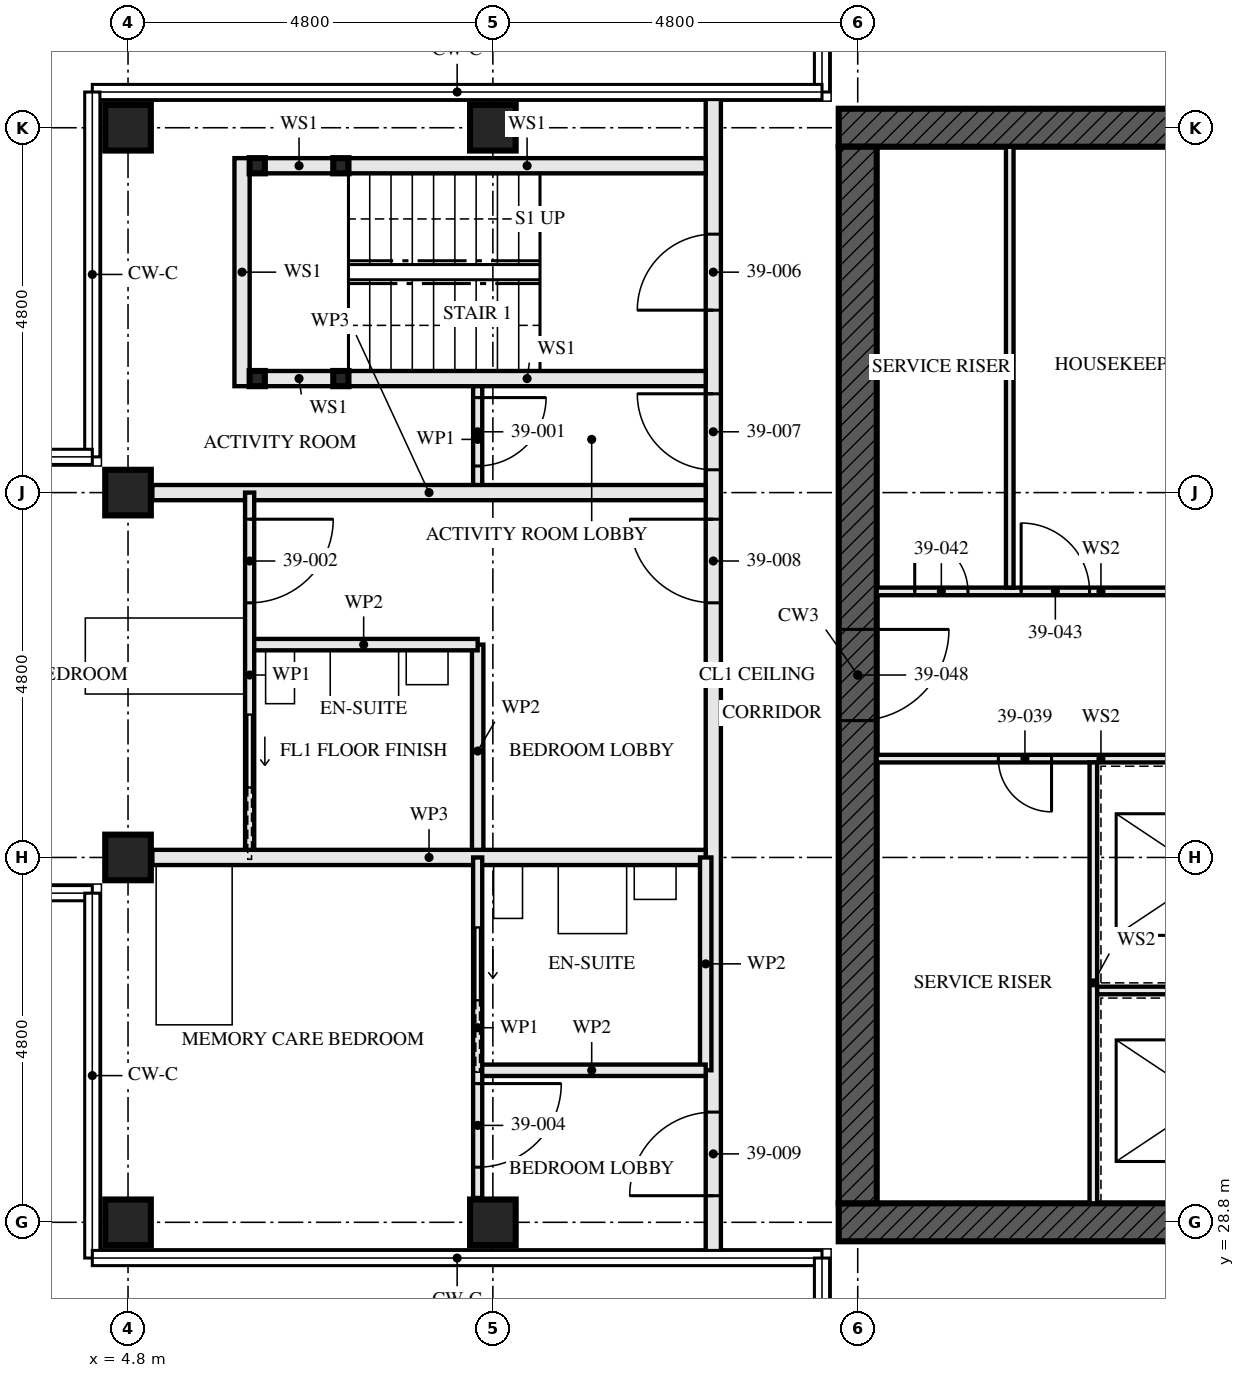
"""IFC4 building model, lengths in metres.
Left out: names, types, materials, properties, quantities, classifications, styles, units other than length and angle.
Written with IfcOpenShell. Run it as: python <this file> out.ifc"""

import sys

from ifc_helpers import new_model, si_unit, direction, frame, frame_2d, origin, origin_2d, place, context, subcontext, project, spatial, rectangle, hollow_rectangle, extrude, element, fill, save


model = new_model("IFC4")
c1 = context("Model", 3, precision=1e-05, world=origin(), true_north=direction((0.0, 1.0)))
c2 = subcontext(c1, "Body", "Model", "MODEL_VIEW")
j1 = project(units=[si_unit("LENGTHUNIT", "METRE"), si_unit("PLANEANGLEUNIT", "RADIAN")], contexts=[c1])
p1 = place(None, origin())
s1 = spatial("IfcSite", under=j1, at=p1, CompositionType="ELEMENT")
p2 = place(p1, origin())
s2 = spatial("IfcBuilding", under=s1, at=p2, CompositionType="ELEMENT")
p3 = place(p2, frame((0.0, 0.0, 144.5)))
s3 = spatial("IfcBuildingStorey", under=s2, at=p3, CompositionType="ELEMENT", Elevation=144.5)
for number, where, z_axis, x_axis in (
    (1, (4.8, 28.8, 0.0), (0.0, 0.0, 1.0), (0.0, 1.0, 0.0)),
    (2, (4.8, 33.6, 0.0), (0.0, 0.0, 1.0), (0.0, 1.0, 0.0)),
    (3, (4.8, 38.4, 0.0), (0.0, 0.0, 1.0), (0.0, 1.0, 0.0)),
    (4, (4.8, 43.2, 0.0), (0.0, 0.0, 1.0), (0.0, 1.0, 0.0)),
    (5, (9.6, 28.8, 0.0), (0.0, 0.0, 1.0), (0.0, 1.0, 0.0)),
    (6, (9.6, 43.2, 0.0), (0.0, 0.0, 1.0), (0.0, 1.0, 0.0)),
):
    element("IfcColumn", number, at=place(p3, frame(where, z_axis=z_axis, x_axis=x_axis)), inside=s3, PredefinedType="COLUMN", context=c2, shape_type="SweptSolid", body=[
        extrude(hollow_rectangle(XDim=0.6, YDim=0.6, WallThickness=0.08, at=origin_2d()), origin(), (0.0, 0.0, 1.0), 3.5),
    ])
p4 = place(p3, frame((14.15, 28.8, -0.17), z_axis=(0.0, 0.0, 1.0), x_axis=(1.0, 0.0, 0.0)))
e7 = element("IfcWall", 7, at=p4, inside=s3, PredefinedType="SHEAR", context=c2, shape_type="SweptSolid", body=[
    extrude(rectangle(XDim=14.9, YDim=0.5, at=frame_2d((7.45, 0.0))), origin(), (0.0, 0.0, 1.0), 3.5),
])
p5 = place(p4, frame((6.85, 0.0, 0.17)))
e8 = element("IfcOpeningElement", 8, at=p5, cuts=e7, PredefinedType="OPENING", context=c2, shape_type="SweptSolid", body=[
    extrude(rectangle(XDim=1.2, YDim=2.1, at=frame_2d((0.6, 1.05))), frame((0.0, 0.26, 0.0), z_axis=(0.0, -1.0, 0.0), x_axis=(1.0, 0.0, 0.0)), (0.0, 0.0, 1.0), 0.521),
])
p6 = place(p3, frame((29.05, 43.2, -0.17), z_axis=(0.0, 0.0, 1.0), x_axis=(-1.0, 0.0, 0.0)))
e9 = element("IfcWall", 9, at=p6, inside=s3, PredefinedType="SHEAR", context=c2, shape_type="SweptSolid", body=[
    extrude(rectangle(XDim=14.9, YDim=0.5, at=frame_2d((7.45, 0.0))), origin(), (0.0, 0.0, 1.0), 3.5),
])
p7 = place(p6, frame((6.85, 0.0, 0.17)))
e10 = element("IfcOpeningElement", 10, at=p7, cuts=e9, PredefinedType="OPENING", context=c2, shape_type="SweptSolid", body=[
    extrude(rectangle(XDim=1.2, YDim=2.1, at=frame_2d((0.6, 1.05))), frame((0.0, 0.26, 0.0), z_axis=(0.0, -1.0, 0.0), x_axis=(1.0, 0.0, 0.0)), (0.0, 0.0, 1.0), 0.521),
])
p8 = place(p3, frame((14.4, 42.95, -0.17), z_axis=(0.0, 0.0, 1.0), x_axis=(0.0, -1.0, 0.0)))
e11 = element("IfcWall", 11, at=p8, inside=s3, PredefinedType="SHEAR", context=c2, shape_type="SweptSolid", body=[
    extrude(rectangle(XDim=13.9, YDim=0.5, at=frame_2d((6.95, 0.0))), origin(), (0.0, 0.0, 1.0), 3.5),
])
p9 = place(p8, frame((6.35, 0.0, 0.17)))
e12 = element("IfcOpeningElement", 12, at=p9, cuts=e11, PredefinedType="OPENING", context=c2, shape_type="SweptSolid", body=[
    extrude(rectangle(XDim=1.2, YDim=2.1, at=frame_2d((0.6, 1.05))), frame((0.0, 0.26, 0.0), z_axis=(0.0, -1.0, 0.0), x_axis=(1.0, 0.0, 0.0)), (0.0, 0.0, 1.0), 0.521),
])
for number, where, z_axis, x_axis in (
    (13, (6.5, 42.7, 0.0), (0.0, 0.0, 1.0), (1.0, 0.0, 0.0)),
    (14, (6.5, 39.9, 0.0), (0.0, 0.0, 1.0), (1.0, 0.0, 0.0)),
    (15, (7.6, 42.7, 0.0), (0.0, 0.0, 1.0), (1.0, 0.0, 0.0)),
    (16, (7.6, 39.9, 0.0), (0.0, 0.0, 1.0), (1.0, 0.0, 0.0)),
):
    element("IfcColumn", number, at=place(p3, frame(where, z_axis=z_axis, x_axis=x_axis)), inside=s3, PredefinedType="COLUMN", context=c2, shape_type="SweptSolid", body=[
        extrude(hollow_rectangle(XDim=0.2, YDim=0.2, WallThickness=0.008, at=origin_2d()), origin(), (0.0, 0.0, 1.0), 3.33),
    ])
p10 = place(p3, frame((6.6, 42.7, 0.0), z_axis=(0.0, 0.0, 1.0), x_axis=(1.0, 0.0, 0.0)))
e17 = element("IfcWall", 17, at=p10, inside=s3, PredefinedType="SOLIDWALL", context=c2, shape_type="SweptSolid", body=[
    extrude(rectangle(XDim=0.9, YDim=0.2, at=frame_2d((0.45, 0.0))), origin(), (0.0, 0.0, 1.0), 2.99),
])
p11 = place(p3, frame((7.7, 42.7, 0.0), z_axis=(0.0, 0.0, 1.0), x_axis=(1.0, 0.0, 0.0)))
e18 = element("IfcWall", 18, at=p11, inside=s3, PredefinedType="SOLIDWALL", context=c2, shape_type="SweptSolid", body=[
    extrude(rectangle(XDim=4.7, YDim=0.2, at=frame_2d((2.35, 0.0))), origin(), (0.0, 0.0, 1.0), 2.99),
])
p12 = place(p3, frame((6.6, 39.9, 0.0), z_axis=(0.0, 0.0, 1.0), x_axis=(1.0, 0.0, 0.0)))
e19 = element("IfcWall", 19, at=p12, inside=s3, PredefinedType="SOLIDWALL", context=c2, shape_type="SweptSolid", body=[
    extrude(rectangle(XDim=0.9, YDim=0.2, at=frame_2d((0.45, 0.0))), origin(), (0.0, 0.0, 1.0), 2.99),
])
p13 = place(p3, frame((7.7, 39.9, 0.0), z_axis=(0.0, 0.0, 1.0), x_axis=(1.0, 0.0, 0.0)))
e20 = element("IfcWall", 20, at=p13, inside=s3, PredefinedType="SOLIDWALL", context=c2, shape_type="SweptSolid", body=[
    extrude(rectangle(XDim=4.7, YDim=0.2, at=frame_2d((2.35, 0.0))), origin(), (0.0, 0.0, 1.0), 2.99),
])
p14 = place(p3, frame((6.3, 42.8, 0.0), z_axis=(0.0, 0.0, 1.0), x_axis=(0.0, -1.0, 0.0)))
e21 = element("IfcWall", 21, at=p14, inside=s3, PredefinedType="SOLIDWALL", context=c2, shape_type="SweptSolid", body=[
    extrude(rectangle(XDim=3.0, YDim=0.2, at=frame_2d((1.5, 0.0))), origin(), (0.0, 0.0, 1.0), 3.33),
])
p15 = place(p3, frame((9.4, 39.8, 0.0), z_axis=(0.0, 0.0, 1.0), x_axis=(0.0, -1.0, 0.0)))
e22 = element("IfcWall", 22, at=p15, inside=s3, PredefinedType="PARTITIONING", context=c2, shape_type="SweptSolid", body=[
    extrude(rectangle(XDim=1.4, YDim=0.12, at=frame_2d((0.7, 0.0))), origin(), (0.0, 0.0, 1.0), 3.33),
])
p16 = place(p15, frame((0.15, 0.0, 0.0)))
e23 = element("IfcOpeningElement", 23, at=p16, cuts=e22, PredefinedType="OPENING", context=c2, shape_type="SweptSolid", body=[
    extrude(rectangle(XDim=0.9, YDim=2.1, at=frame_2d((0.45, 1.05))), frame((0.0, 0.071, 0.0), z_axis=(0.0, -1.0, 0.0), x_axis=(1.0, 0.0, 0.0)), (0.0, 0.0, 1.0), 0.141),
])
p17 = place(p3, frame((5.12, 38.4, 0.0), z_axis=(0.0, 0.0, 1.0), x_axis=(1.0, 0.0, 0.0)))
e24 = element("IfcWall", 24, at=p17, inside=s3, PredefinedType="PARTITIONING", context=c2, shape_type="SweptSolid", body=[
    extrude(rectangle(XDim=7.28, YDim=0.2, at=frame_2d((3.64, 0.0))), origin(), (0.0, 0.0, 1.0), 2.55),
])
p18 = place(p3, frame((6.4, 36.4, 0.0), z_axis=(0.0, 0.0, 1.0), x_axis=(1.0, 0.0, 0.0)))
e25 = element("IfcWall", 25, at=p18, inside=s3, PredefinedType="PARTITIONING", context=c2, shape_type="SweptSolid", body=[
    extrude(rectangle(XDim=3.0, YDim=0.15, at=frame_2d((1.5, 0.0))), origin(), (0.0, 0.0, 1.0), 3.33),
])
p19 = place(p3, frame((9.4, 36.4, 0.0), z_axis=(0.0, 0.0, 1.0), x_axis=(0.0, -1.0, 0.0)))
e26 = element("IfcWall", 26, at=p19, inside=s3, PredefinedType="PARTITIONING", context=c2, shape_type="SweptSolid", body=[
    extrude(rectangle(XDim=2.8, YDim=0.15, at=frame_2d((1.4, 0.0))), origin(), (0.0, 0.0, 1.0), 3.33),
])
p20 = place(p3, frame((6.4, 38.4, 0.0), z_axis=(0.0, 0.0, 1.0), x_axis=(0.0, -1.0, 0.0)))
e27 = element("IfcWall", 27, at=p20, inside=s3, PredefinedType="PARTITIONING", context=c2, shape_type="SweptSolid", body=[
    extrude(rectangle(XDim=4.8, YDim=0.12, at=frame_2d((2.4, 0.0))), origin(), (0.0, 0.0, 1.0), 3.33),
])
p21 = place(p20, frame((0.35, 0.0, 0.0)))
e28 = element("IfcOpeningElement", 28, at=p21, cuts=e27, PredefinedType="OPENING", context=c2, shape_type="SweptSolid", body=[
    extrude(rectangle(XDim=1.1, YDim=2.1, at=frame_2d((0.55, 1.05))), frame((0.0, 0.071, 0.0), z_axis=(0.0, -1.0, 0.0), x_axis=(1.0, 0.0, 0.0)), (0.0, 0.0, 1.0), 0.141),
])
p22 = place(p20, frame((2.925, 0.0, 0.0)))
e29 = element("IfcOpeningElement", 29, at=p22, cuts=e27, PredefinedType="OPENING", context=c2, shape_type="SweptSolid", body=[
    extrude(rectangle(XDim=0.95, YDim=2.1, at=frame_2d((0.475, 1.05))), frame((0.0, 0.071, 0.0), z_axis=(0.0, -1.0, 0.0), x_axis=(1.0, 0.0, 0.0)), (0.0, 0.0, 1.0), 0.141),
])
p23 = place(p3, frame((5.12, 33.6, 0.0), z_axis=(0.0, 0.0, 1.0), x_axis=(1.0, 0.0, 0.0)))
e30 = element("IfcWall", 30, at=p23, inside=s3, PredefinedType="PARTITIONING", context=c2, shape_type="SweptSolid", body=[
    extrude(rectangle(XDim=7.28, YDim=0.2, at=frame_2d((3.64, 0.0))), origin(), (0.0, 0.0, 1.0), 2.55),
])
p24 = place(p3, frame((9.4, 30.8, 0.0), z_axis=(0.0, 0.0, 1.0), x_axis=(1.0, 0.0, 0.0)))
e31 = element("IfcWall", 31, at=p24, inside=s3, PredefinedType="PARTITIONING", context=c2, shape_type="SweptSolid", body=[
    extrude(rectangle(XDim=3.0, YDim=0.15, at=frame_2d((1.5, 0.0))), origin(), (0.0, 0.0, 1.0), 3.33),
])
p25 = place(p3, frame((12.4, 33.6, 0.0), z_axis=(0.0, 0.0, 1.0), x_axis=(0.0, -1.0, 0.0)))
e32 = element("IfcWall", 32, at=p25, inside=s3, PredefinedType="PARTITIONING", context=c2, shape_type="SweptSolid", body=[
    extrude(rectangle(XDim=2.8, YDim=0.15, at=frame_2d((1.4, 0.0))), origin(), (0.0, 0.0, 1.0), 3.33),
])
p26 = place(p3, frame((9.4, 33.6, 0.0), z_axis=(0.0, 0.0, 1.0), x_axis=(0.0, -1.0, 0.0)))
e33 = element("IfcWall", 33, at=p26, inside=s3, PredefinedType="PARTITIONING", context=c2, shape_type="SweptSolid", body=[
    extrude(rectangle(XDim=4.48, YDim=0.12, at=frame_2d((2.24, 0.0))), origin(), (0.0, 0.0, 1.0), 3.33),
])
p27 = place(p26, frame((2.975, 0.0, 0.0)))
e34 = element("IfcOpeningElement", 34, at=p27, cuts=e33, PredefinedType="OPENING", context=c2, shape_type="SweptSolid", body=[
    extrude(rectangle(XDim=1.1, YDim=2.1, at=frame_2d((0.55, 1.05))), frame((0.0, 0.071, 0.0), z_axis=(0.0, -1.0, 0.0), x_axis=(1.0, 0.0, 0.0)), (0.0, 0.0, 1.0), 0.141),
])
p28 = place(p26, frame((0.925, 0.0, 0.0)))
e35 = element("IfcOpeningElement", 35, at=p28, cuts=e33, PredefinedType="OPENING", context=c2, shape_type="SweptSolid", body=[
    extrude(rectangle(XDim=0.95, YDim=2.1, at=frame_2d((0.475, 1.05))), frame((0.0, 0.071, 0.0), z_axis=(0.0, -1.0, 0.0), x_axis=(1.0, 0.0, 0.0)), (0.0, 0.0, 1.0), 0.141),
])
p29 = place(p3, frame((12.5, 43.65, 0.0), z_axis=(0.0, 0.0, 1.0), x_axis=(0.0, -1.0, 0.0)))
e36 = element("IfcWall", 36, at=p29, inside=s3, PredefinedType="PARTITIONING", context=c2, shape_type="SweptSolid", body=[
    extrude(rectangle(XDim=15.3, YDim=0.2, at=frame_2d((7.65, 0.0))), origin(), (0.0, 0.0, 1.0), 2.32),
])
p30 = place(p29, frame((1.85, 0.0, 0.0)))
e37 = element("IfcOpeningElement", 37, at=p30, cuts=e36, PredefinedType="OPENING", context=c2, shape_type="SweptSolid", body=[
    extrude(rectangle(XDim=1.0, YDim=2.1, at=frame_2d((0.5, 1.05))), frame((0.0, 0.111, 0.0), z_axis=(0.0, -1.0, 0.0), x_axis=(1.0, 0.0, 0.0)), (0.0, 0.0, 1.0), 0.221),
])
p31 = place(p29, frame((3.95, 0.0, 0.0)))
e38 = element("IfcOpeningElement", 38, at=p31, cuts=e36, PredefinedType="OPENING", context=c2, shape_type="SweptSolid", body=[
    extrude(rectangle(XDim=1.0, YDim=2.1, at=frame_2d((0.5, 1.05))), frame((0.0, 0.111, 0.0), z_axis=(0.0, -1.0, 0.0), x_axis=(1.0, 0.0, 0.0)), (0.0, 0.0, 1.0), 0.221),
])
p32 = place(p29, frame((5.6, 0.0, 0.0)))
e39 = element("IfcOpeningElement", 39, at=p32, cuts=e36, PredefinedType="OPENING", context=c2, shape_type="SweptSolid", body=[
    extrude(rectangle(XDim=1.1, YDim=2.1, at=frame_2d((0.55, 1.05))), frame((0.0, 0.111, 0.0), z_axis=(0.0, -1.0, 0.0), x_axis=(1.0, 0.0, 0.0)), (0.0, 0.0, 1.0), 0.221),
])
p33 = place(p29, frame((13.4, 0.0, 0.0)))
e40 = element("IfcOpeningElement", 40, at=p33, cuts=e36, PredefinedType="OPENING", context=c2, shape_type="SweptSolid", body=[
    extrude(rectangle(XDim=1.1, YDim=2.1, at=frame_2d((0.55, 1.05))), frame((0.0, 0.111, 0.0), z_axis=(0.0, -1.0, 0.0), x_axis=(1.0, 0.0, 0.0)), (0.0, 0.0, 1.0), 0.221),
])
p34 = place(p3, frame((16.4, 37.15, 0.0), z_axis=(0.0, 0.0, 1.0), x_axis=(0.0, 1.0, 0.0)))
e41 = element("IfcWall", 41, at=p34, inside=s3, PredefinedType="SOLIDWALL", context=c2, shape_type="SweptSolid", body=[
    extrude(rectangle(XDim=5.8, YDim=0.1, at=frame_2d((2.9, 0.0))), origin(), (0.0, 0.0, 1.0), 3.33),
])
p35 = place(p3, frame((14.65, 34.9, 0.0), z_axis=(0.0, 0.0, 1.0), x_axis=(1.0, 0.0, 0.0)))
e42 = element("IfcWall", 42, at=p35, inside=s3, PredefinedType="SOLIDWALL", context=c2, shape_type="SweptSolid", body=[
    extrude(rectangle(XDim=5.9, YDim=0.1, at=frame_2d((2.95, 0.0))), origin(), (0.0, 0.0, 1.0), 3.33),
])
p36 = place(p35, frame((1.6, 0.0, 0.0)))
e43 = element("IfcOpeningElement", 43, at=p36, cuts=e42, PredefinedType="OPENING", context=c2, shape_type="SweptSolid", body=[
    extrude(rectangle(XDim=0.7, YDim=2.1, at=frame_2d((0.35, 1.05))), frame((0.0, 0.061, 0.0), z_axis=(0.0, -1.0, 0.0), x_axis=(1.0, 0.0, 0.0)), (0.0, 0.0, 1.0), 0.121),
])
p37 = place(p3, frame((14.65, 37.1, 0.0), z_axis=(0.0, 0.0, 1.0), x_axis=(1.0, 0.0, 0.0)))
e44 = element("IfcWall", 44, at=p37, inside=s3, PredefinedType="SOLIDWALL", context=c2, shape_type="SweptSolid", body=[
    extrude(rectangle(XDim=5.9, YDim=0.1, at=frame_2d((2.95, 0.0))), origin(), (0.0, 0.0, 1.0), 3.33),
])
p38 = place(p37, frame((0.5, 0.0, 0.0)))
e45 = element("IfcOpeningElement", 45, at=p38, cuts=e44, PredefinedType="OPENING", context=c2, shape_type="SweptSolid", body=[
    extrude(rectangle(XDim=0.7, YDim=2.1, at=frame_2d((0.35, 1.05))), frame((0.0, 0.061, 0.0), z_axis=(0.0, -1.0, 0.0), x_axis=(1.0, 0.0, 0.0)), (0.0, 0.0, 1.0), 0.121),
])
p39 = place(p37, frame((1.9, 0.0, 0.0)))
e46 = element("IfcOpeningElement", 46, at=p39, cuts=e44, PredefinedType="OPENING", context=c2, shape_type="SweptSolid", body=[
    extrude(rectangle(XDim=0.9, YDim=2.1, at=frame_2d((0.45, 1.05))), frame((0.0, 0.061, 0.0), z_axis=(0.0, -1.0, 0.0), x_axis=(1.0, 0.0, 0.0)), (0.0, 0.0, 1.0), 0.121),
])
p40 = place(p3, frame((17.5, 29.05, 0.0), z_axis=(0.0, 0.0, 1.0), x_axis=(0.0, 1.0, 0.0)))
e47 = element("IfcWall", 47, at=p40, inside=s3, PredefinedType="SOLIDWALL", context=c2, shape_type="SweptSolid", body=[
    extrude(rectangle(XDim=5.8, YDim=0.1, at=frame_2d((2.9, 0.0))), origin(), (0.0, 0.0, 1.0), 3.33),
])
p41 = place(p3, frame((17.55, 31.85, 0.0), z_axis=(0.0, 0.0, 1.0), x_axis=(1.0, 0.0, 0.0)))
e48 = element("IfcWall", 48, at=p41, inside=s3, PredefinedType="SOLIDWALL", context=c2, shape_type="SweptSolid", body=[
    extrude(rectangle(XDim=2.9, YDim=0.1, at=frame_2d((1.45, 0.0))), origin(), (0.0, 0.0, 1.0), 3.33),
])
p42 = place(p16, origin())
e49 = element("IfcDoor", 49, at=p42, inside=s3, OperationType="SINGLE_SWING_RIGHT", PredefinedType="DOOR", context=c2, shape_type="SweptSolid", body=[
    extrude(rectangle(XDim=0.9, YDim=2.1, at=frame_2d((0.45, 1.05))), frame((0.0, 0.022, 0.0), z_axis=(0.0, -1.0, 0.0), x_axis=(1.0, 0.0, 0.0)), (0.0, 0.0, 1.0), 0.044),
])
fill(e23, e49)
p43 = place(p21, origin())
e50 = element("IfcDoor", 50, at=p43, inside=s3, OperationType="SINGLE_SWING_RIGHT", PredefinedType="DOOR", context=c2, shape_type="SweptSolid", body=[
    extrude(rectangle(XDim=1.1, YDim=2.1, at=frame_2d((0.55, 1.05))), frame((0.0, 0.022, 0.0), z_axis=(0.0, -1.0, 0.0), x_axis=(1.0, 0.0, 0.0)), (0.0, 0.0, 1.0), 0.044),
])
fill(e28, e50)
p44 = place(p22, origin())
e51 = element("IfcDoor", 51, at=p44, inside=s3, OperationType="SLIDING_TO_LEFT", PredefinedType="DOOR", context=c2, shape_type="SweptSolid", body=[
    extrude(rectangle(XDim=0.95, YDim=2.1, at=frame_2d((0.475, 1.05))), frame((0.0, 0.022, 0.0), z_axis=(0.0, -1.0, 0.0), x_axis=(1.0, 0.0, 0.0)), (0.0, 0.0, 1.0), 0.044),
])
fill(e29, e51)
p45 = place(p27, origin())
e52 = element("IfcDoor", 52, at=p45, inside=s3, OperationType="SINGLE_SWING_RIGHT", PredefinedType="DOOR", context=c2, shape_type="SweptSolid", body=[
    extrude(rectangle(XDim=1.1, YDim=2.1, at=frame_2d((0.55, 1.05))), frame((0.0, 0.022, 0.0), z_axis=(0.0, -1.0, 0.0), x_axis=(1.0, 0.0, 0.0)), (0.0, 0.0, 1.0), 0.044),
])
fill(e34, e52)
p46 = place(p28, origin())
e53 = element("IfcDoor", 53, at=p46, inside=s3, OperationType="SLIDING_TO_LEFT", PredefinedType="DOOR", context=c2, shape_type="SweptSolid", body=[
    extrude(rectangle(XDim=0.95, YDim=2.1, at=frame_2d((0.475, 1.05))), frame((0.0, 0.022, 0.0), z_axis=(0.0, -1.0, 0.0), x_axis=(1.0, 0.0, 0.0)), (0.0, 0.0, 1.0), 0.044),
])
fill(e35, e53)
p47 = place(p30, frame((1.0, 0.0, 0.0), z_axis=(0.0, 0.0, 1.0), x_axis=(-1.0, 0.0, 0.0)))
e54 = element("IfcDoor", 54, at=p47, inside=s3, OperationType="SINGLE_SWING_RIGHT", PredefinedType="DOOR", context=c2, shape_type="SweptSolid", body=[
    extrude(rectangle(XDim=1.0, YDim=2.1, at=frame_2d((0.5, 1.05))), frame((0.0, 0.032, 0.0), z_axis=(0.0, -1.0, 0.0), x_axis=(1.0, 0.0, 0.0)), (0.0, 0.0, 1.0), 0.064),
])
fill(e37, e54)
p48 = place(p31, frame((1.0, 0.0, 0.0), z_axis=(0.0, 0.0, 1.0), x_axis=(-1.0, 0.0, 0.0)))
e55 = element("IfcDoor", 55, at=p48, inside=s3, OperationType="SINGLE_SWING_LEFT", PredefinedType="DOOR", context=c2, shape_type="SweptSolid", body=[
    extrude(rectangle(XDim=1.0, YDim=2.1, at=frame_2d((0.5, 1.05))), frame((0.0, 0.027, 0.0), z_axis=(0.0, -1.0, 0.0), x_axis=(1.0, 0.0, 0.0)), (0.0, 0.0, 1.0), 0.054),
])
fill(e38, e55)
p49 = place(p32, frame((1.1, 0.0, 0.0), z_axis=(0.0, 0.0, 1.0), x_axis=(-1.0, 0.0, 0.0)))
e56 = element("IfcDoor", 56, at=p49, inside=s3, OperationType="SINGLE_SWING_LEFT", PredefinedType="DOOR", context=c2, shape_type="SweptSolid", body=[
    extrude(rectangle(XDim=1.1, YDim=2.1, at=frame_2d((0.55, 1.05))), frame((0.0, 0.027, 0.0), z_axis=(0.0, -1.0, 0.0), x_axis=(1.0, 0.0, 0.0)), (0.0, 0.0, 1.0), 0.054),
])
fill(e39, e56)
p50 = place(p33, frame((1.1, 0.0, 0.0), z_axis=(0.0, 0.0, 1.0), x_axis=(-1.0, 0.0, 0.0)))
e57 = element("IfcDoor", 57, at=p50, inside=s3, OperationType="SINGLE_SWING_RIGHT", PredefinedType="DOOR", context=c2, shape_type="SweptSolid", body=[
    extrude(rectangle(XDim=1.1, YDim=2.1, at=frame_2d((0.55, 1.05))), frame((0.0, 0.027, 0.0), z_axis=(0.0, -1.0, 0.0), x_axis=(1.0, 0.0, 0.0)), (0.0, 0.0, 1.0), 0.054),
])
fill(e40, e57)
p51 = place(p36, frame((0.7, 0.0, 0.0), z_axis=(0.0, 0.0, 1.0), x_axis=(-1.0, 0.0, 0.0)))
e58 = element("IfcDoor", 58, at=p51, inside=s3, OperationType="SINGLE_SWING_RIGHT", PredefinedType="DOOR", context=c2, shape_type="SweptSolid", body=[
    extrude(rectangle(XDim=0.7, YDim=2.1, at=frame_2d((0.35, 1.05))), frame((0.0, 0.027, 0.0), z_axis=(0.0, -1.0, 0.0), x_axis=(1.0, 0.0, 0.0)), (0.0, 0.0, 1.0), 0.054),
])
fill(e43, e58)
p52 = place(p38, origin())
e59 = element("IfcDoor", 59, at=p52, inside=s3, OperationType="SINGLE_SWING_RIGHT", PredefinedType="DOOR", context=c2, shape_type="SweptSolid", body=[
    extrude(rectangle(XDim=0.7, YDim=2.1, at=frame_2d((0.35, 1.05))), frame((0.0, 0.027, 0.0), z_axis=(0.0, -1.0, 0.0), x_axis=(1.0, 0.0, 0.0)), (0.0, 0.0, 1.0), 0.054),
])
fill(e45, e59)
p53 = place(p39, origin())
e60 = element("IfcDoor", 60, at=p53, inside=s3, OperationType="SINGLE_SWING_RIGHT", PredefinedType="DOOR", context=c2, shape_type="SweptSolid", body=[
    extrude(rectangle(XDim=0.9, YDim=2.1, at=frame_2d((0.45, 1.05))), frame((0.0, 0.027, 0.0), z_axis=(0.0, -1.0, 0.0), x_axis=(1.0, 0.0, 0.0)), (0.0, 0.0, 1.0), 0.054),
])
fill(e46, e60)
p54 = place(p9, origin())
e61 = element("IfcDoor", 61, at=p54, inside=s3, OperationType="SINGLE_SWING_LEFT", PredefinedType="DOOR", context=c2, shape_type="SweptSolid", body=[
    extrude(rectangle(XDim=1.2, YDim=2.1, at=frame_2d((0.6, 1.05))), frame((0.0, 0.027, 0.0), z_axis=(0.0, -1.0, 0.0), x_axis=(1.0, 0.0, 0.0)), (0.0, 0.0, 1.0), 0.054),
])
fill(e12, e61)
save(model, sys.argv[1])
